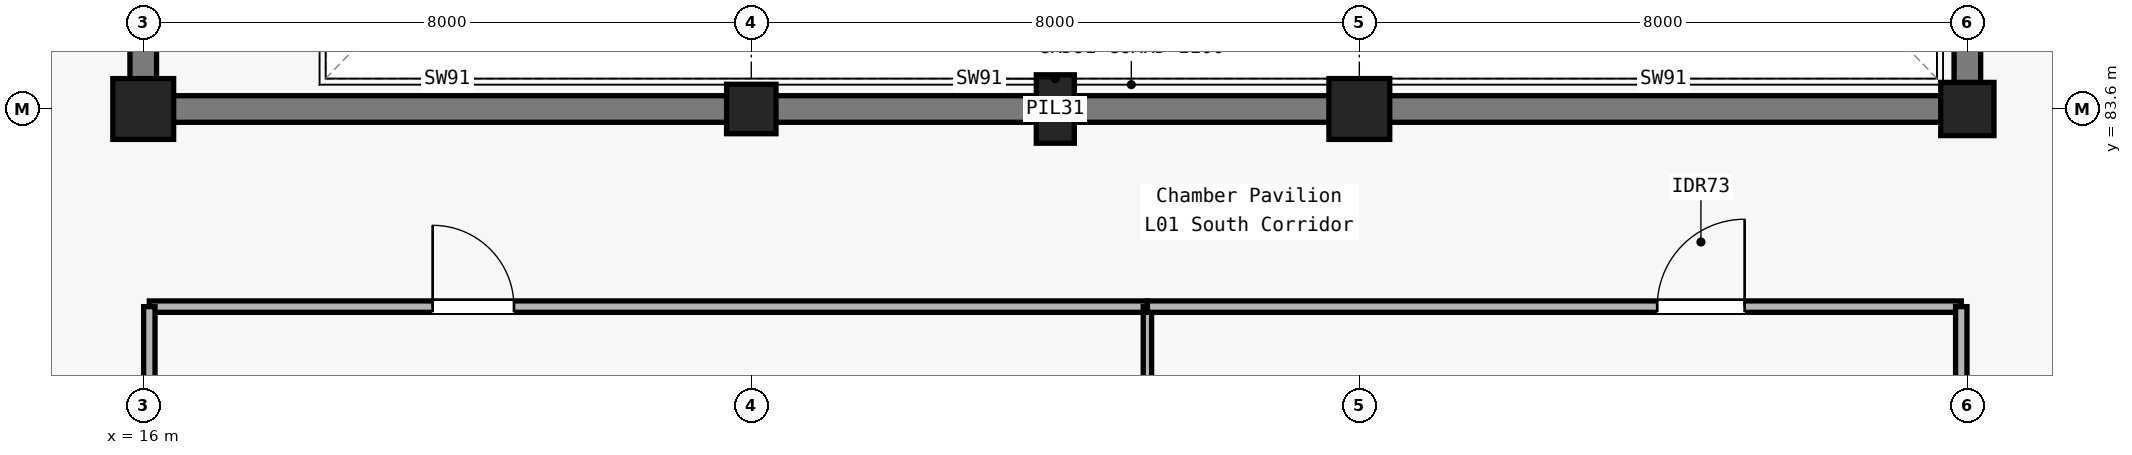
"""IFC4 building model, lengths in metres.
Left out: names, types, materials, properties, quantities, classifications, styles, units other than length and angle.
Written with IfcOpenShell. Run it as: python <this file> out.ifc"""

import sys

from ifc_helpers import new_model, si_unit, direction, frame, frame_2d, origin, origin_2d, place, context, subcontext, project, spatial, rectangle, circle, extrude, element, fill, save


model = new_model("IFC4")
c1 = context("Model", 3, precision=1e-05, world=origin(), true_north=direction((0.0, 1.0)))
c2 = subcontext(c1, "Body", "Model", "MODEL_VIEW")
j1 = project(units=[si_unit("LENGTHUNIT", "METRE"), si_unit("PLANEANGLEUNIT", "RADIAN")], contexts=[c1])
p1 = place(None, origin())
s1 = spatial("IfcSite", under=j1, at=p1, CompositionType="ELEMENT")
p2 = place(p1, origin())
s2 = spatial("IfcBuilding", under=s1, at=p2, CompositionType="ELEMENT")
p3 = place(p2, frame((0.0, 0.0, 5.4)))
s3 = spatial("IfcBuildingStorey", under=s2, at=p3, CompositionType="ELEMENT", Elevation=5.4)
p4 = place(p3, frame((16.0, 83.6, 0.0), z_axis=(0.0, 0.0, 1.0), x_axis=(1.0, 0.0, 0.0)))
e1 = element("IfcColumn", 1, at=p4, inside=s3, PredefinedType="COLUMN", context=c2, shape_type="SweptSolid", body=[
    extrude(circle(Radius=0.4, at=origin_2d()), origin(), (0.0, 0.0, 1.0), 4.8),
])
p5 = place(p3, frame((24.0, 83.6, 0.0), z_axis=(0.0, 0.0, 1.0), x_axis=(1.0, 0.0, 0.0)))
e2 = element("IfcColumn", 2, at=p5, inside=s3, PredefinedType="COLUMN", context=c2, shape_type="SweptSolid", body=[
    extrude(circle(Radius=0.325, at=origin_2d()), origin(), (0.0, 0.0, 1.0), 4.8),
])
p6 = place(p3, frame((32.0, 83.6, 0.0), z_axis=(0.0, 0.0, 1.0), x_axis=(1.0, 0.0, 0.0)))
e3 = element("IfcColumn", 3, at=p6, inside=s3, PredefinedType="COLUMN", context=c2, shape_type="SweptSolid", body=[
    extrude(rectangle(XDim=0.8, YDim=0.8, at=origin_2d()), origin(), (0.0, 0.0, 1.0), 4.8),
])
p7 = place(p3, frame((40.0, 83.6, 0.0), z_axis=(0.0, 0.0, 1.0), x_axis=(1.0, 0.0, 0.0)))
e4 = element("IfcColumn", 4, at=p7, inside=s3, PredefinedType="COLUMN", context=c2, shape_type="SweptSolid", body=[
    extrude(rectangle(XDim=0.7, YDim=0.7, at=origin_2d()), origin(), (0.0, 0.0, 1.0), 4.8),
])
p8 = place(p3, frame((28.0, 83.6, 0.0), z_axis=(0.0, 0.0, 1.0), x_axis=(1.0, 0.0, 0.0)))
e5 = element("IfcColumn", 5, at=p8, inside=s3, PredefinedType="PILASTER", context=c2, shape_type="SweptSolid", body=[
    extrude(rectangle(XDim=0.5, YDim=0.9, at=origin_2d()), origin(), (0.0, 0.0, 1.0), 4.8),
])
for number, where, z_axis, x_axis in (
    (6, (16.0, 83.6, 0.0), (0.0, 0.0, 1.0), (1.0, 0.0, 0.0)),
    (7, (24.0, 83.6, 0.0), (0.0, 0.0, 1.0), (1.0, 0.0, 0.0)),
    (8, (32.0, 83.6, 0.0), (0.0, 0.0, 1.0), (1.0, 0.0, 0.0)),
):
    element("IfcWall", number, at=place(p3, frame(where, z_axis=z_axis, x_axis=x_axis)), inside=s3, PredefinedType="SHEAR", context=c2, shape_type="SweptSolid", body=[
        extrude(rectangle(XDim=8.0, YDim=0.35, at=frame_2d((4.0, 0.0))), origin(), (0.0, 0.0, 1.0), 4.51),
    ])
p9 = place(p3, frame((16.0, 83.6, 0.0), z_axis=(0.0, 0.0, 1.0), x_axis=(0.0, 1.0, 0.0)))
e9 = element("IfcWall", 9, at=p9, inside=s3, PredefinedType="SHEAR", context=c2, shape_type="SweptSolid", body=[
    extrude(rectangle(XDim=7.6, YDim=0.35, at=frame_2d((3.8, 0.0))), origin(), (0.0, 0.0, 1.0), 4.51),
])
p10 = place(p9, frame((2.9, 0.0, 0.0)))
e10 = element("IfcOpeningElement", 10, at=p10, cuts=e9, PredefinedType="OPENING", context=c2, shape_type="SweptSolid", body=[
    extrude(rectangle(XDim=1.75, YDim=2.25, at=frame_2d((0.875, 1.125))), frame((0.0, 0.185, 0.0), z_axis=(0.0, -1.0, 0.0), x_axis=(1.0, 0.0, 0.0)), (0.0, 0.0, 1.0), 0.37),
])
p11 = place(p3, frame((40.0, 83.6, 0.0), z_axis=(0.0, 0.0, 1.0), x_axis=(0.0, 1.0, 0.0)))
e11 = element("IfcWall", 11, at=p11, inside=s3, PredefinedType="SHEAR", context=c2, shape_type="SweptSolid", body=[
    extrude(rectangle(XDim=7.6, YDim=0.35, at=frame_2d((3.8, 0.0))), origin(), (0.0, 0.0, 1.0), 4.51),
])
p12 = place(p3, frame((16.08, 81.0, 0.0), z_axis=(0.0, 0.0, 1.0), x_axis=(1.0, 0.0, 0.0)))
e12 = element("IfcWall", 12, at=p12, inside=s3, PredefinedType="PARTITIONING", context=c2, shape_type="SweptSolid", body=[
    extrude(rectangle(XDim=13.132, YDim=0.15, at=frame_2d((6.566, 0.0))), origin(), (0.0, 0.0, 1.0), 3.735),
])
p13 = place(p12, frame((3.728, 0.0, 0.0)))
e13 = element("IfcOpeningElement", 13, at=p13, cuts=e12, PredefinedType="OPENING", context=c2, shape_type="SweptSolid", body=[
    extrude(rectangle(XDim=1.07, YDim=2.15, at=frame_2d((0.535, 1.075))), frame((0.0, 0.085, 0.0), z_axis=(0.0, -1.0, 0.0), x_axis=(1.0, 0.0, 0.0)), (0.0, 0.0, 1.0), 0.17),
])
p14 = place(p3, frame((29.212, 68.48, 0.0), z_axis=(0.0, 0.0, 1.0), x_axis=(0.0, 1.0, 0.0)))
e14 = element("IfcWall", 14, at=p14, inside=s3, PredefinedType="PARTITIONING", context=c2, shape_type="SweptSolid", body=[
    extrude(rectangle(XDim=12.52, YDim=0.11, at=frame_2d((6.26, 0.0))), origin(), (0.0, 0.0, 1.0), 3.905),
])
p15 = place(p3, frame((29.212, 81.0, 0.0), z_axis=(0.0, 0.0, 1.0), x_axis=(1.0, 0.0, 0.0)))
e15 = element("IfcWall", 15, at=p15, inside=s3, PredefinedType="PARTITIONING", context=c2, shape_type="SweptSolid", body=[
    extrude(rectangle(XDim=10.708, YDim=0.15, at=frame_2d((5.354, 0.0))), origin(), (0.0, 0.0, 1.0), 3.685),
])
p16 = place(p15, frame((6.708, 0.0, 0.0)))
e16 = element("IfcOpeningElement", 16, at=p16, cuts=e15, PredefinedType="OPENING", context=c2, shape_type="SweptSolid", body=[
    extrude(rectangle(XDim=1.15, YDim=2.15, at=frame_2d((0.575, 1.075))), frame((0.0, 0.085, 0.0), z_axis=(0.0, -1.0, 0.0), x_axis=(1.0, 0.0, 0.0)), (0.0, 0.0, 1.0), 0.17),
])
p17 = place(p3, frame((16.08, 68.7, 0.0), z_axis=(0.0, 0.0, 1.0), x_axis=(0.0, 1.0, 0.0)))
e17 = element("IfcWall", 17, at=p17, inside=s3, PredefinedType="PARTITIONING", context=c2, shape_type="SweptSolid", body=[
    extrude(rectangle(XDim=12.3, YDim=0.15, at=frame_2d((6.15, 0.0))), origin(), (0.0, 0.0, 1.0), 2.69),
])
p18 = place(p3, frame((39.92, 68.725, 0.0), z_axis=(0.0, 0.0, 1.0), x_axis=(0.0, 1.0, 0.0)))
e18 = element("IfcWall", 18, at=p18, inside=s3, PredefinedType="PARTITIONING", context=c2, shape_type="SweptSolid", body=[
    extrude(rectangle(XDim=12.275, YDim=0.15, at=frame_2d((6.137, 0.0))), origin(), (0.0, 0.0, 1.0), 3.86),
])
p19 = place(p13, origin())
e19 = element("IfcDoor", 19, at=p19, inside=s3, OperationType="SINGLE_SWING_LEFT", PredefinedType="DOOR", context=c2, shape_type="SweptSolid", body=[
    extrude(rectangle(XDim=1.07, YDim=2.15, at=frame_2d((0.535, 1.075))), frame((0.0, 0.025, 0.0), z_axis=(0.0, -1.0, 0.0), x_axis=(1.0, 0.0, 0.0)), (0.0, 0.0, 1.0), 0.05),
])
fill(e13, e19)
p20 = place(p16, origin())
e20 = element("IfcDoor", 20, at=p20, inside=s3, OperationType="SINGLE_SWING_RIGHT", PredefinedType="DOOR", context=c2, shape_type="SweptSolid", body=[
    extrude(rectangle(XDim=1.15, YDim=2.15, at=frame_2d((0.575, 1.075))), frame((0.0, 0.025, 0.0), z_axis=(0.0, -1.0, 0.0), x_axis=(1.0, 0.0, 0.0)), (0.0, 0.0, 1.0), 0.05),
])
fill(e16, e20)
save(model, sys.argv[1])
